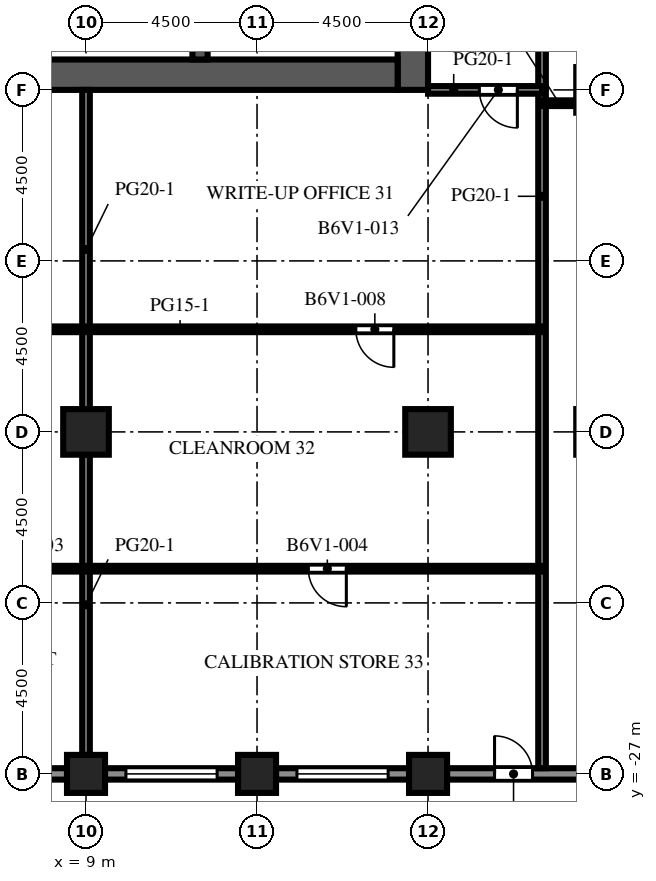
"""IFC4 building model, lengths in metres.
Left out: names, types, materials, properties, quantities, classifications, styles, units other than length and angle.
Written with IfcOpenShell. Run it as: python <this file> out.ifc"""

import sys

from ifc_helpers import new_model, si_unit, direction, frame, frame_2d, origin, origin_2d, place, context, subcontext, project, spatial, rectangle, extrude, element, fill, save


model = new_model("IFC4")
c1 = context("Model", 3, precision=1e-05, world=origin(), true_north=direction((0.0, 1.0)))
c2 = subcontext(c1, "Body", "Model", "MODEL_VIEW")
j1 = project(units=[si_unit("LENGTHUNIT", "METRE"), si_unit("PLANEANGLEUNIT", "RADIAN")], contexts=[c1])
p1 = place(None, origin())
s1 = spatial("IfcSite", under=j1, at=p1, CompositionType="ELEMENT")
p2 = place(p1, origin())
s2 = spatial("IfcBuilding", under=s1, at=p2, CompositionType="ELEMENT")
p3 = place(p2, frame((0.0, 0.0, 207.9)))
s3 = spatial("IfcBuildingStorey", under=s2, at=p3, CompositionType="ELEMENT", Elevation=207.9)
for number, where, z_axis, x_axis in (
    (1, (9.0, -27.0, 0.0), (0.0, 0.0, 1.0), (1.0, 0.0, 0.0)),
    (2, (13.5, -27.0, 0.0), (0.0, 0.0, 1.0), (1.0, 0.0, 0.0)),
    (3, (18.0, -27.0, 0.0), (0.0, 0.0, 1.0), (1.0, 0.0, 0.0)),
):
    element("IfcColumn", number, at=place(p3, frame(where, z_axis=z_axis, x_axis=x_axis)), inside=s3, PredefinedType="COLUMN", context=c2, shape_type="SweptSolid", body=[
        extrude(rectangle(XDim=1.0, YDim=1.0, at=origin_2d()), origin(), (0.0, 0.0, 1.0), 4.1),
    ])
for number, where, z_axis, x_axis in (
    (4, (9.0, -18.0, 0.0), (0.0, 0.0, 1.0), (1.0, 0.0, 0.0)),
    (5, (18.0, -18.0, 0.0), (0.0, 0.0, 1.0), (1.0, 0.0, 0.0)),
):
    element("IfcColumn", number, at=place(p3, frame(where, z_axis=z_axis, x_axis=x_axis)), inside=s3, PredefinedType="COLUMN", context=c2, shape_type="SweptSolid", body=[
        extrude(rectangle(XDim=1.2, YDim=1.2, at=origin_2d()), origin(), (0.0, 0.0, 1.0), 4.1),
    ])
p4 = place(p3, frame((17.6, -9.0, 0.0), z_axis=(0.0, 0.0, 1.0), x_axis=(0.0, 1.0, 0.0)))
e6 = element("IfcWall", 6, at=p4, inside=s3, PredefinedType="SHEAR", context=c2, shape_type="SweptSolid", body=[
    extrude(rectangle(XDim=27.5, YDim=0.8, at=frame_2d((13.75, 0.0))), origin(), (0.0, 0.0, 1.0), 4.1),
])
p5 = place(p4, frame((12.55, 0.0, 0.0)))
e7 = element("IfcOpeningElement", 7, at=p5, cuts=e6, PredefinedType="OPENING", context=c2, shape_type="SweptSolid", body=[
    extrude(rectangle(XDim=2.4, YDim=2.4, at=frame_2d((1.2, 1.2))), frame((0.0, 0.41, 0.0), z_axis=(0.0, -1.0, 0.0), x_axis=(1.0, 0.0, 0.0)), (0.0, 0.0, 1.0), 0.82),
])
p6 = place(p4, frame((6.825, 0.0, 0.0)))
e8 = element("IfcOpeningElement", 8, at=p6, cuts=e6, PredefinedType="OPENING", context=c2, shape_type="SweptSolid", body=[
    extrude(rectangle(XDim=1.2, YDim=2.1, at=frame_2d((0.6, 1.05))), frame((0.0, 0.41, 0.0), z_axis=(0.0, -1.0, 0.0), x_axis=(1.0, 0.0, 0.0)), (0.0, 0.0, 1.0), 0.82),
])
p7 = place(p4, frame((19.475, 0.0, 0.0)))
e9 = element("IfcOpeningElement", 9, at=p7, cuts=e6, PredefinedType="OPENING", context=c2, shape_type="SweptSolid", body=[
    extrude(rectangle(XDim=1.2, YDim=2.1, at=frame_2d((0.6, 1.05))), frame((0.0, 0.41, 0.0), z_axis=(0.0, -1.0, 0.0), x_axis=(1.0, 0.0, 0.0)), (0.0, 0.0, 1.0), 0.82),
])
p8 = place(p3, frame((6.8, -8.6, 0.0), z_axis=(0.0, 0.0, 1.0), x_axis=(1.0, 0.0, 0.0)))
e10 = element("IfcWall", 10, at=p8, inside=s3, PredefinedType="SHEAR", context=c2, shape_type="SweptSolid", body=[
    extrude(rectangle(XDim=10.4, YDim=0.8, at=frame_2d((5.2, 0.0))), origin(), (0.0, 0.0, 1.0), 4.1),
])
p9 = place(p3, frame((12.0, -8.2, 0.0), z_axis=(0.0, 0.0, 1.0), x_axis=(0.0, 1.0, 0.0)))
e11 = element("IfcWall", 11, at=p9, inside=s3, PredefinedType="SHEAR", context=c2, shape_type="SweptSolid", body=[
    extrude(rectangle(XDim=7.5, YDim=0.4, at=frame_2d((3.75, 0.0))), origin(), (0.0, 0.0, 1.0), 4.1),
])
p10 = place(p3, frame((8.5, -27.0, 0.0), z_axis=(0.0, 0.0, 1.0), x_axis=(-1.0, 0.0, 0.0)))
e12 = element("IfcWall", 12, at=p10, inside=s3, PredefinedType="SOLIDWALL", context=c2, shape_type="SweptSolid", body=[
    extrude(rectangle(XDim=3.5, YDim=0.3, at=frame_2d((1.75, 0.0))), origin(), (0.0, 0.0, 1.0), 2.85),
])
p11 = place(p10, frame((0.55, 0.0, 0.8)))
e13 = element("IfcOpeningElement", 13, at=p11, cuts=e12, PredefinedType="OPENING", context=c2, shape_type="SweptSolid", body=[
    extrude(rectangle(XDim=2.4, YDim=1.7, at=frame_2d((1.2, 0.85))), frame((0.0, 0.16, 0.0), z_axis=(0.0, -1.0, 0.0), x_axis=(1.0, 0.0, 0.0)), (0.0, 0.0, 1.0), 0.32),
])
p12 = place(p3, frame((13.0, -27.0, 0.0), z_axis=(0.0, 0.0, 1.0), x_axis=(-1.0, 0.0, 0.0)))
e14 = element("IfcWall", 14, at=p12, inside=s3, PredefinedType="SOLIDWALL", context=c2, shape_type="SweptSolid", body=[
    extrude(rectangle(XDim=3.5, YDim=0.3, at=frame_2d((1.75, 0.0))), origin(), (0.0, 0.0, 1.0), 2.85),
])
p13 = place(p12, frame((0.55, 0.0, 0.8)))
e15 = element("IfcOpeningElement", 15, at=p13, cuts=e14, PredefinedType="OPENING", context=c2, shape_type="SweptSolid", body=[
    extrude(rectangle(XDim=2.4, YDim=1.7, at=frame_2d((1.2, 0.85))), frame((0.0, 0.16, 0.0), z_axis=(0.0, -1.0, 0.0), x_axis=(1.0, 0.0, 0.0)), (0.0, 0.0, 1.0), 0.32),
])
p14 = place(p3, frame((17.5, -27.0, 0.0), z_axis=(0.0, 0.0, 1.0), x_axis=(-1.0, 0.0, 0.0)))
e16 = element("IfcWall", 16, at=p14, inside=s3, PredefinedType="SOLIDWALL", context=c2, shape_type="SweptSolid", body=[
    extrude(rectangle(XDim=3.5, YDim=0.3, at=frame_2d((1.75, 0.0))), origin(), (0.0, 0.0, 1.0), 2.85),
])
p15 = place(p14, frame((0.55, 0.0, 0.8)))
e17 = element("IfcOpeningElement", 17, at=p15, cuts=e16, PredefinedType="OPENING", context=c2, shape_type="SweptSolid", body=[
    extrude(rectangle(XDim=2.4, YDim=1.7, at=frame_2d((1.2, 0.85))), frame((0.0, 0.16, 0.0), z_axis=(0.0, -1.0, 0.0), x_axis=(1.0, 0.0, 0.0)), (0.0, 0.0, 1.0), 0.32),
])
p16 = place(p3, frame((22.0, -27.0, 0.0), z_axis=(0.0, 0.0, 1.0), x_axis=(-1.0, 0.0, 0.0)))
e18 = element("IfcWall", 18, at=p16, inside=s3, PredefinedType="SOLIDWALL", context=c2, shape_type="SweptSolid", body=[
    extrude(rectangle(XDim=3.5, YDim=0.3, at=frame_2d((1.75, 0.0))), origin(), (0.0, 0.0, 1.0), 2.85),
])
p17 = place(p16, frame((1.25, 0.0, 0.0)))
e19 = element("IfcOpeningElement", 19, at=p17, cuts=e18, PredefinedType="OPENING", context=c2, shape_type="SweptSolid", body=[
    extrude(rectangle(XDim=1.0, YDim=2.2, at=frame_2d((0.5, 1.1))), frame((0.0, 0.16, 0.0), z_axis=(0.0, -1.0, 0.0), x_axis=(1.0, 0.0, 0.0)), (0.0, 0.0, 1.0), 0.32),
])
p18 = place(p3, frame((8.3, -8.2, 0.0), z_axis=(0.0, 0.0, 1.0), x_axis=(0.0, 1.0, 0.0)))
e20 = element("IfcWall", 20, at=p18, inside=s3, PredefinedType="PARTITIONING", context=c2, shape_type="SweptSolid", body=[
    extrude(rectangle(XDim=2.25, YDim=0.1, at=frame_2d((1.125, 0.0))), origin(), (0.0, 0.0, 1.0), 3.65),
])
p19 = place(p18, frame((0.625, 0.0, 0.0)))
e21 = element("IfcOpeningElement", 21, at=p19, cuts=e20, PredefinedType="OPENING", context=c2, shape_type="SweptSolid", body=[
    extrude(rectangle(XDim=1.0, YDim=2.1, at=frame_2d((0.5, 1.05))), frame((0.0, 0.06, 0.0), z_axis=(0.0, -1.0, 0.0), x_axis=(1.0, 0.0, 0.0)), (0.0, 0.0, 1.0), 0.12),
])
p20 = place(p3, frame((9.0, -26.5, 0.0), z_axis=(0.0, 0.0, 1.0), x_axis=(0.0, 1.0, 0.0)))
e22 = element("IfcWall", 22, at=p20, inside=s3, PredefinedType="PARTITIONING", context=c2, shape_type="SweptSolid", body=[
    extrude(rectangle(XDim=7.9, YDim=0.2, at=frame_2d((3.95, 0.0))), origin(), (0.0, 0.0, 1.0), 3.65),
])
p21 = place(p3, frame((9.0, -17.4, 0.0), z_axis=(0.0, 0.0, 1.0), x_axis=(0.0, 1.0, 0.0)))
e23 = element("IfcWall", 23, at=p21, inside=s3, PredefinedType="PARTITIONING", context=c2, shape_type="SweptSolid", body=[
    extrude(rectangle(XDim=8.4, YDim=0.2, at=frame_2d((4.2, 0.0))), origin(), (0.0, 0.0, 1.0), 3.65),
])
p22 = place(p3, frame((21.0, -26.85, 0.0), z_axis=(0.0, 0.0, 1.0), x_axis=(0.0, 1.0, 0.0)))
e24 = element("IfcWall", 24, at=p22, inside=s3, PredefinedType="PARTITIONING", context=c2, shape_type="SweptSolid", body=[
    extrude(rectangle(XDim=30.1, YDim=0.2, at=frame_2d((15.05, 0.0))), origin(), (0.0, 0.0, 1.0), 3.65),
])
p23 = place(p3, frame((21.0, -21.6, 0.0), z_axis=(0.0, 0.0, 1.0), x_axis=(-1.0, 0.0, 0.0)))
e25 = element("IfcWall", 25, at=p23, inside=s3, PredefinedType="PARTITIONING", context=c2, shape_type="SweptSolid", body=[
    extrude(rectangle(XDim=34.5, YDim=0.15, at=frame_2d((17.25, 0.0))), origin(), (0.0, 0.0, 1.0), 3.65),
])
p24 = place(p23, frame((29.9, 0.0, 0.0)))
e26 = element("IfcOpeningElement", 26, at=p24, cuts=e25, PredefinedType="OPENING", context=c2, shape_type="SweptSolid", body=[
    extrude(rectangle(XDim=1.0, YDim=2.1, at=frame_2d((0.5, 1.05))), frame((0.0, 0.085, 0.0), z_axis=(0.0, -1.0, 0.0), x_axis=(1.0, 0.0, 0.0)), (0.0, 0.0, 1.0), 0.17),
])
p25 = place(p23, frame((21.4, 0.0, 0.0)))
e27 = element("IfcOpeningElement", 27, at=p25, cuts=e25, PredefinedType="OPENING", context=c2, shape_type="SweptSolid", body=[
    extrude(rectangle(XDim=1.0, YDim=2.1, at=frame_2d((0.5, 1.05))), frame((0.0, 0.085, 0.0), z_axis=(0.0, -1.0, 0.0), x_axis=(1.0, 0.0, 0.0)), (0.0, 0.0, 1.0), 0.17),
])
p26 = place(p23, frame((13.15, 0.0, 0.0)))
e28 = element("IfcOpeningElement", 28, at=p26, cuts=e25, PredefinedType="OPENING", context=c2, shape_type="SweptSolid", body=[
    extrude(rectangle(XDim=1.0, YDim=2.1, at=frame_2d((0.5, 1.05))), frame((0.0, 0.085, 0.0), z_axis=(0.0, -1.0, 0.0), x_axis=(1.0, 0.0, 0.0)), (0.0, 0.0, 1.0), 0.17),
])
p27 = place(p23, frame((5.15, 0.0, 0.0)))
e29 = element("IfcOpeningElement", 29, at=p27, cuts=e25, PredefinedType="OPENING", context=c2, shape_type="SweptSolid", body=[
    extrude(rectangle(XDim=1.0, YDim=2.1, at=frame_2d((0.5, 1.05))), frame((0.0, 0.085, 0.0), z_axis=(0.0, -1.0, 0.0), x_axis=(1.0, 0.0, 0.0)), (0.0, 0.0, 1.0), 0.17),
])
p28 = place(p3, frame((21.0, -15.3, 0.0), z_axis=(0.0, 0.0, 1.0), x_axis=(-1.0, 0.0, 0.0)))
e30 = element("IfcWall", 30, at=p28, inside=s3, PredefinedType="PARTITIONING", context=c2, shape_type="SweptSolid", body=[
    extrude(rectangle(XDim=34.5, YDim=0.15, at=frame_2d((17.25, 0.0))), origin(), (0.0, 0.0, 1.0), 3.65),
])
p29 = place(p28, frame((28.9, 0.0, 0.0)))
e31 = element("IfcOpeningElement", 31, at=p29, cuts=e30, PredefinedType="OPENING", context=c2, shape_type="SweptSolid", body=[
    extrude(rectangle(XDim=1.0, YDim=2.1, at=frame_2d((0.5, 1.05))), frame((0.0, 0.085, 0.0), z_axis=(0.0, -1.0, 0.0), x_axis=(1.0, 0.0, 0.0)), (0.0, 0.0, 1.0), 0.17),
])
p30 = place(p28, frame((19.4, 0.0, 0.0)))
e32 = element("IfcOpeningElement", 32, at=p30, cuts=e30, PredefinedType="OPENING", context=c2, shape_type="SweptSolid", body=[
    extrude(rectangle(XDim=1.0, YDim=2.1, at=frame_2d((0.5, 1.05))), frame((0.0, 0.085, 0.0), z_axis=(0.0, -1.0, 0.0), x_axis=(1.0, 0.0, 0.0)), (0.0, 0.0, 1.0), 0.17),
])
p31 = place(p28, frame((14.15, 0.0, 0.0)))
e33 = element("IfcOpeningElement", 33, at=p31, cuts=e30, PredefinedType="OPENING", context=c2, shape_type="SweptSolid", body=[
    extrude(rectangle(XDim=1.0, YDim=2.1, at=frame_2d((0.5, 1.05))), frame((0.0, 0.085, 0.0), z_axis=(0.0, -1.0, 0.0), x_axis=(1.0, 0.0, 0.0)), (0.0, 0.0, 1.0), 0.17),
])
p32 = place(p28, frame((3.9, 0.0, 0.0)))
e34 = element("IfcOpeningElement", 34, at=p32, cuts=e30, PredefinedType="OPENING", context=c2, shape_type="SweptSolid", body=[
    extrude(rectangle(XDim=1.0, YDim=2.1, at=frame_2d((0.5, 1.05))), frame((0.0, 0.085, 0.0), z_axis=(0.0, -1.0, 0.0), x_axis=(1.0, 0.0, 0.0)), (0.0, 0.0, 1.0), 0.17),
])
p33 = place(p3, frame((21.0, -9.35, 0.0), z_axis=(0.0, 0.0, 1.0), x_axis=(1.0, 0.0, 0.0)))
e35 = element("IfcWall", 35, at=p33, inside=s3, PredefinedType="PARTITIONING", context=c2, shape_type="SweptSolid", body=[
    extrude(rectangle(XDim=0.9, YDim=0.15, at=frame_2d((0.45, 0.0))), origin(), (0.0, 0.0, 1.0), 3.65),
])
p34 = place(p3, frame((21.0, -9.0, 0.0), z_axis=(0.0, 0.0, 1.0), x_axis=(-1.0, 0.0, 0.0)))
e36 = element("IfcWall", 36, at=p34, inside=s3, PredefinedType="PARTITIONING", context=c2, shape_type="SweptSolid", body=[
    extrude(rectangle(XDim=3.0, YDim=0.2, at=frame_2d((1.5, 0.0))), origin(), (0.0, 0.0, 1.0), 3.65),
])
p35 = place(p34, frame((0.65, 0.0, 0.0)))
e37 = element("IfcOpeningElement", 37, at=p35, cuts=e36, PredefinedType="OPENING", context=c2, shape_type="SweptSolid", body=[
    extrude(rectangle(XDim=1.0, YDim=2.1, at=frame_2d((0.5, 1.05))), frame((0.0, 0.11, 0.0), z_axis=(0.0, -1.0, 0.0), x_axis=(1.0, 0.0, 0.0)), (0.0, 0.0, 1.0), 0.22),
])
p36 = place(p13, origin())
e38 = element("IfcWindow", 38, at=p36, inside=s3, PartitioningType="SINGLE_PANEL", PredefinedType="WINDOW", context=c2, shape_type="SweptSolid", body=[
    extrude(rectangle(XDim=2.4, YDim=1.7, at=frame_2d((1.2, 0.85))), frame((0.0, 0.03, 0.0), z_axis=(0.0, -1.0, 0.0), x_axis=(1.0, 0.0, 0.0)), (0.0, 0.0, 1.0), 0.06),
])
fill(e15, e38)
p37 = place(p15, origin())
e39 = element("IfcWindow", 39, at=p37, inside=s3, PartitioningType="SINGLE_PANEL", PredefinedType="WINDOW", context=c2, shape_type="SweptSolid", body=[
    extrude(rectangle(XDim=2.4, YDim=1.7, at=frame_2d((1.2, 0.85))), frame((0.0, 0.03, 0.0), z_axis=(0.0, -1.0, 0.0), x_axis=(1.0, 0.0, 0.0)), (0.0, 0.0, 1.0), 0.06),
])
fill(e17, e39)
p38 = place(p17, origin())
e40 = element("IfcDoor", 40, at=p38, inside=s3, OperationType="SINGLE_SWING_RIGHT", PredefinedType="DOOR", context=c2, shape_type="SweptSolid", body=[
    extrude(rectangle(XDim=1.0, YDim=2.2, at=frame_2d((0.5, 1.1))), frame((0.0, 0.025, 0.0), z_axis=(0.0, -1.0, 0.0), x_axis=(1.0, 0.0, 0.0)), (0.0, 0.0, 1.0), 0.05),
])
fill(e19, e40)
p39 = place(p27, origin())
e41 = element("IfcDoor", 41, at=p39, inside=s3, OperationType="SINGLE_SWING_LEFT", PredefinedType="DOOR", context=c2, shape_type="SweptSolid", body=[
    extrude(rectangle(XDim=1.0, YDim=2.1, at=frame_2d((0.5, 1.05))), frame((0.0, 0.025, 0.0), z_axis=(0.0, -1.0, 0.0), x_axis=(1.0, 0.0, 0.0)), (0.0, 0.0, 1.0), 0.05),
])
fill(e29, e41)
p40 = place(p32, origin())
e42 = element("IfcDoor", 42, at=p40, inside=s3, OperationType="SINGLE_SWING_LEFT", PredefinedType="DOOR", context=c2, shape_type="SweptSolid", body=[
    extrude(rectangle(XDim=1.0, YDim=2.1, at=frame_2d((0.5, 1.05))), frame((0.0, 0.025, 0.0), z_axis=(0.0, -1.0, 0.0), x_axis=(1.0, 0.0, 0.0)), (0.0, 0.0, 1.0), 0.05),
])
fill(e34, e42)
p41 = place(p35, origin())
e43 = element("IfcDoor", 43, at=p41, inside=s3, OperationType="SINGLE_SWING_LEFT", PredefinedType="DOOR", context=c2, shape_type="SweptSolid", body=[
    extrude(rectangle(XDim=1.0, YDim=2.1, at=frame_2d((0.5, 1.05))), frame((0.0, 0.025, 0.0), z_axis=(0.0, -1.0, 0.0), x_axis=(1.0, 0.0, 0.0)), (0.0, 0.0, 1.0), 0.05),
])
fill(e37, e43)
save(model, sys.argv[1])
